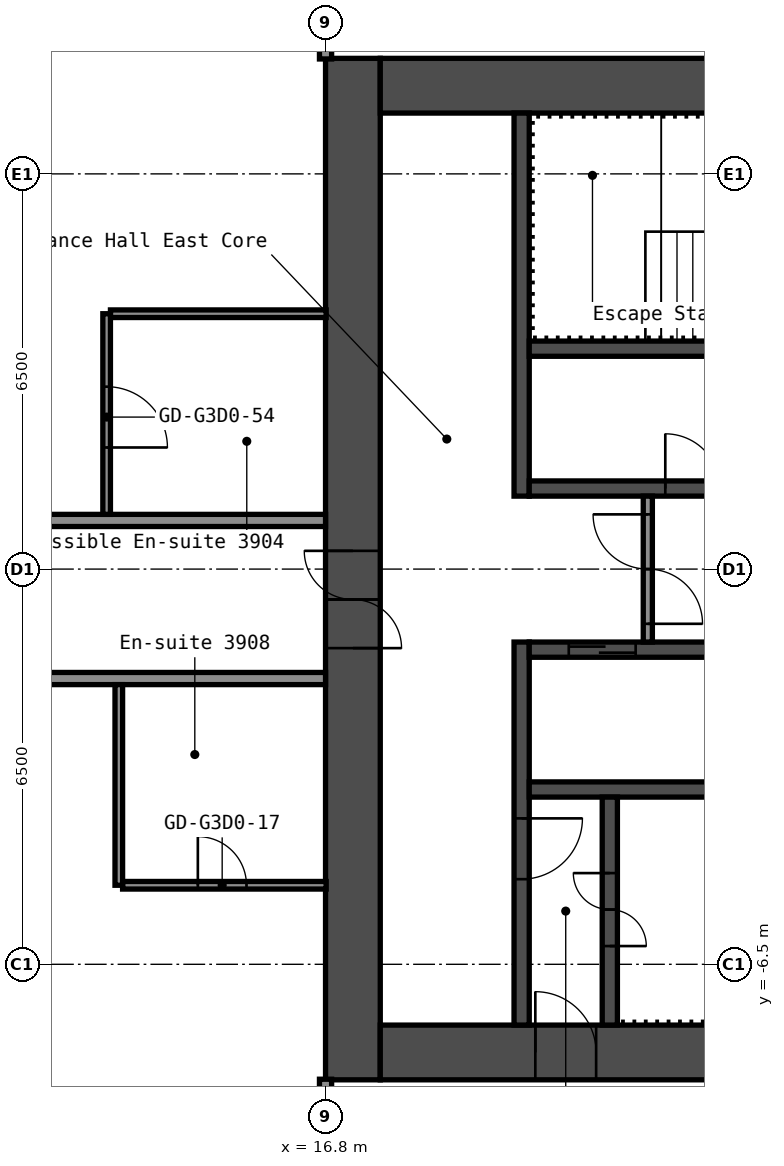
"""IFC4 building model, lengths in metres.
Left out: names, types, materials, properties, quantities, classifications, styles, units other than length and angle.
Written with IfcOpenShell. Run it as: python <this file> out.ifc"""

import sys

from ifc_helpers import new_model, si_unit, direction, frame, frame_2d, origin, place, context, subcontext, project, spatial, rectangle, extrude, element, fill, save


model = new_model("IFC4")
c1 = context("Model", 3, precision=1e-05, world=origin(), true_north=direction((0.0, 1.0)))
c2 = subcontext(c1, "Body", "Model", "MODEL_VIEW")
j1 = project(units=[si_unit("LENGTHUNIT", "METRE"), si_unit("PLANEANGLEUNIT", "RADIAN")], contexts=[c1])
p1 = place(None, origin())
s1 = spatial("IfcSite", under=j1, at=p1, CompositionType="ELEMENT")
p2 = place(p1, origin())
s2 = spatial("IfcBuilding", under=s1, at=p2, CompositionType="ELEMENT")
p3 = place(p2, frame((0.0, 0.0, 140.6)))
s3 = spatial("IfcBuildingStorey", under=s2, at=p3, CompositionType="ELEMENT", Elevation=140.6)
p4 = place(p3, frame((17.25, -8.4, 0.0), z_axis=(0.0, 0.0, 1.0), x_axis=(0.0, 1.0, 0.0)))
e1 = element("IfcWall", 1, at=p4, inside=s3, PredefinedType="SHEAR", context=c2, shape_type="SweptSolid", body=[
    extrude(rectangle(XDim=16.8, YDim=0.9, at=frame_2d((8.4, 0.0))), origin(), (0.0, 0.0, 1.0), 2.75),
])
p5 = place(p4, frame((7.1, 0.0, 0.0)))
e2 = element("IfcOpeningElement", 2, at=p5, cuts=e1, PredefinedType="OPENING", context=c2, shape_type="SweptSolid", body=[
    extrude(rectangle(XDim=1.6, YDim=2.1, at=frame_2d((0.8, 1.05))), frame((0.0, 0.46, 0.0), z_axis=(0.0, -1.0, 0.0), x_axis=(1.0, 0.0, 0.0)), (0.0, 0.0, 1.0), 0.92),
])
p6 = place(p3, frame((17.7, 7.95, 0.0), z_axis=(0.0, 0.0, 1.0), x_axis=(1.0, 0.0, 0.0)))
e3 = element("IfcWall", 3, at=p6, inside=s3, PredefinedType="SHEAR", context=c2, shape_type="SweptSolid", body=[
    extrude(rectangle(XDim=15.0, YDim=0.9, at=frame_2d((7.5, 0.0))), origin(), (0.0, 0.0, 1.0), 2.75),
])
p7 = place(p6, frame((10.4, 0.0, 0.0)))
e4 = element("IfcOpeningElement", 4, at=p7, cuts=e3, PredefinedType="OPENING", context=c2, shape_type="SweptSolid", body=[
    extrude(rectangle(XDim=1.2, YDim=2.1, at=frame_2d((0.6, 1.05))), frame((0.0, 0.46, 0.0), z_axis=(0.0, -1.0, 0.0), x_axis=(1.0, 0.0, 0.0)), (0.0, 0.0, 1.0), 0.92),
])
p8 = place(p6, frame((13.35, 0.0, 0.0)))
e5 = element("IfcOpeningElement", 5, at=p8, cuts=e3, PredefinedType="OPENING", context=c2, shape_type="SweptSolid", body=[
    extrude(rectangle(XDim=0.9, YDim=2.1, at=frame_2d((0.45, 1.05))), frame((0.0, 0.46, 0.0), z_axis=(0.0, -1.0, 0.0), x_axis=(1.0, 0.0, 0.0)), (0.0, 0.0, 1.0), 0.92),
])
p9 = place(p3, frame((17.7, -7.95, 0.0), z_axis=(0.0, 0.0, 1.0), x_axis=(1.0, 0.0, 0.0)))
e6 = element("IfcWall", 6, at=p9, inside=s3, PredefinedType="SHEAR", context=c2, shape_type="SweptSolid", body=[
    extrude(rectangle(XDim=15.0, YDim=0.9, at=frame_2d((7.5, 0.0))), origin(), (0.0, 0.0, 1.0), 2.75),
])
p10 = place(p9, frame((2.55, 0.0, 0.0)))
e7 = element("IfcOpeningElement", 7, at=p10, cuts=e6, PredefinedType="OPENING", context=c2, shape_type="SweptSolid", body=[
    extrude(rectangle(XDim=1.0, YDim=2.1, at=frame_2d((0.5, 1.05))), frame((0.0, 0.46, 0.0), z_axis=(0.0, -1.0, 0.0), x_axis=(1.0, 0.0, 0.0)), (0.0, 0.0, 1.0), 0.92),
])
p11 = place(p3, frame((20.025, 1.2, 0.0), z_axis=(0.0, 0.0, 1.0), x_axis=(0.0, 1.0, 0.0)))
e8 = element("IfcWall", 8, at=p11, inside=s3, PredefinedType="SHEAR", context=c2, shape_type="SweptSolid", body=[
    extrude(rectangle(XDim=6.3, YDim=0.25, at=frame_2d((3.15, 0.0))), origin(), (0.0, 0.0, 1.0), 2.75),
])
p12 = place(p3, frame((20.025, -7.5, 0.0), z_axis=(0.0, 0.0, 1.0), x_axis=(0.0, 1.0, 0.0)))
e9 = element("IfcWall", 9, at=p12, inside=s3, PredefinedType="SHEAR", context=c2, shape_type="SweptSolid", body=[
    extrude(rectangle(XDim=6.3, YDim=0.25, at=frame_2d((3.15, 0.0))), origin(), (0.0, 0.0, 1.0), 2.75),
])
p13 = place(p12, frame((2.4, 0.0, 0.0)))
e10 = element("IfcOpeningElement", 10, at=p13, cuts=e9, PredefinedType="OPENING", context=c2, shape_type="SweptSolid", body=[
    extrude(rectangle(XDim=1.0, YDim=2.1, at=frame_2d((0.5, 1.05))), frame((0.0, 0.135, 0.0), z_axis=(0.0, -1.0, 0.0), x_axis=(1.0, 0.0, 0.0)), (0.0, 0.0, 1.0), 0.27),
])
p14 = place(p3, frame((20.15, 1.325, 0.0), z_axis=(0.0, 0.0, 1.0), x_axis=(1.0, 0.0, 0.0)))
e11 = element("IfcWall", 11, at=p14, inside=s3, PredefinedType="SHEAR", context=c2, shape_type="SweptSolid", body=[
    extrude(rectangle(XDim=7.5, YDim=0.25, at=frame_2d((3.75, 0.0))), origin(), (0.0, 0.0, 1.0), 2.75),
])
p15 = place(p14, frame((2.238, 0.0, 0.0)))
e12 = element("IfcOpeningElement", 12, at=p15, cuts=e11, PredefinedType="OPENING", context=c2, shape_type="SweptSolid", body=[
    extrude(rectangle(XDim=0.9, YDim=2.1, at=frame_2d((0.45, 1.05))), frame((0.0, 0.135, 0.0), z_axis=(0.0, -1.0, 0.0), x_axis=(1.0, 0.0, 0.0)), (0.0, 0.0, 1.0), 0.27),
])
p16 = place(p14, frame((5.938, 0.0, 0.0)))
e13 = element("IfcOpeningElement", 13, at=p16, cuts=e11, PredefinedType="OPENING", context=c2, shape_type="SweptSolid", body=[
    extrude(rectangle(XDim=0.9, YDim=2.1, at=frame_2d((0.45, 1.05))), frame((0.0, 0.135, 0.0), z_axis=(0.0, -1.0, 0.0), x_axis=(1.0, 0.0, 0.0)), (0.0, 0.0, 1.0), 0.27),
])
p17 = place(p3, frame((20.15, 3.625, 0.0), z_axis=(0.0, 0.0, 1.0), x_axis=(1.0, 0.0, 0.0)))
e14 = element("IfcWall", 14, at=p17, inside=s3, PredefinedType="SHEAR", context=c2, shape_type="SweptSolid", body=[
    extrude(rectangle(XDim=7.5, YDim=0.25, at=frame_2d((3.75, 0.0))), origin(), (0.0, 0.0, 1.0), 2.75),
])
p18 = place(p3, frame((20.15, -1.325, 0.0), z_axis=(0.0, 0.0, 1.0), x_axis=(1.0, 0.0, 0.0)))
e15 = element("IfcWall", 15, at=p18, inside=s3, PredefinedType="SHEAR", context=c2, shape_type="SweptSolid", body=[
    extrude(rectangle(XDim=7.5, YDim=0.25, at=frame_2d((3.75, 0.0))), origin(), (0.0, 0.0, 1.0), 2.75),
])
p19 = place(p18, frame((0.65, 0.0, 0.0)))
e16 = element("IfcOpeningElement", 16, at=p19, cuts=e15, PredefinedType="OPENING", context=c2, shape_type="SweptSolid", body=[
    extrude(rectangle(XDim=1.1, YDim=2.1, at=frame_2d((0.55, 1.05))), frame((0.0, 0.135, 0.0), z_axis=(0.0, -1.0, 0.0), x_axis=(1.0, 0.0, 0.0)), (0.0, 0.0, 1.0), 0.27),
])
p20 = place(p18, frame((3.05, 0.0, 0.0)))
e17 = element("IfcOpeningElement", 17, at=p20, cuts=e15, PredefinedType="OPENING", context=c2, shape_type="SweptSolid", body=[
    extrude(rectangle(XDim=1.1, YDim=2.1, at=frame_2d((0.55, 1.05))), frame((0.0, 0.135, 0.0), z_axis=(0.0, -1.0, 0.0), x_axis=(1.0, 0.0, 0.0)), (0.0, 0.0, 1.0), 0.27),
])
p21 = place(p18, frame((5.45, 0.0, 0.0)))
e18 = element("IfcOpeningElement", 18, at=p21, cuts=e15, PredefinedType="OPENING", context=c2, shape_type="SweptSolid", body=[
    extrude(rectangle(XDim=1.1, YDim=2.1, at=frame_2d((0.55, 1.05))), frame((0.0, 0.135, 0.0), z_axis=(0.0, -1.0, 0.0), x_axis=(1.0, 0.0, 0.0)), (0.0, 0.0, 1.0), 0.27),
])
p22 = place(p3, frame((20.15, -3.625, 0.0), z_axis=(0.0, 0.0, 1.0), x_axis=(1.0, 0.0, 0.0)))
e19 = element("IfcWall", 19, at=p22, inside=s3, PredefinedType="SHEAR", context=c2, shape_type="SweptSolid", body=[
    extrude(rectangle(XDim=7.5, YDim=0.25, at=frame_2d((3.75, 0.0))), origin(), (0.0, 0.0, 1.0), 2.75),
])
p23 = place(p3, frame((21.475, -7.5, 0.0), z_axis=(0.0, 0.0, 1.0), x_axis=(0.0, 1.0, 0.0)))
e20 = element("IfcWall", 20, at=p23, inside=s3, PredefinedType="SHEAR", context=c2, shape_type="SweptSolid", body=[
    extrude(rectangle(XDim=3.75, YDim=0.25, at=frame_2d((1.875, 0.0))), origin(), (0.0, 0.0, 1.0), 2.75),
])
p24 = place(p23, frame((1.3, 0.0, 0.0)))
e21 = element("IfcOpeningElement", 21, at=p24, cuts=e20, PredefinedType="OPENING", context=c2, shape_type="SweptSolid", body=[
    extrude(rectangle(XDim=1.2, YDim=2.1, at=frame_2d((0.6, 1.05))), frame((0.0, 0.135, 0.0), z_axis=(0.0, -1.0, 0.0), x_axis=(1.0, 0.0, 0.0)), (0.0, 0.0, 1.0), 0.27),
])
p25 = place(p3, frame((22.1, -1.2, 0.0), z_axis=(0.0, 0.0, 1.0), x_axis=(0.0, 1.0, 0.0)))
e22 = element("IfcWall", 22, at=p25, inside=s3, PredefinedType="PARTITIONING", context=c2, shape_type="SweptSolid", body=[
    extrude(rectangle(XDim=2.4, YDim=0.15, at=frame_2d((1.2, 0.0))), origin(), (0.0, 0.0, 1.0), 2.75),
])
p26 = place(p25, frame((0.3, 0.0, 0.0)))
e23 = element("IfcOpeningElement", 23, at=p26, cuts=e22, PredefinedType="OPENING", context=c2, shape_type="SweptSolid", body=[
    extrude(rectangle(XDim=1.8, YDim=2.1, at=frame_2d((0.9, 1.05))), frame((0.0, 0.085, 0.0), z_axis=(0.0, -1.0, 0.0), x_axis=(1.0, 0.0, 0.0)), (0.0, 0.0, 1.0), 0.17),
])
p27 = place(p3, frame((13.462, -5.2, 0.0), z_axis=(0.0, 0.0, 1.0), x_axis=(1.0, 0.0, 0.0)))
e24 = element("IfcWall", 24, at=p27, inside=s3, PredefinedType="PARTITIONING", context=c2, shape_type="SweptSolid", body=[
    extrude(rectangle(XDim=3.348, YDim=0.125, at=frame_2d((1.674, 0.0))), origin(), (0.0, 0.0, 1.0), 2.75),
])
p28 = place(p27, frame((1.238, 0.0, 0.0)))
e25 = element("IfcOpeningElement", 25, at=p28, cuts=e24, PredefinedType="OPENING", context=c2, shape_type="SweptSolid", body=[
    extrude(rectangle(XDim=0.8, YDim=2.1, at=frame_2d((0.4, 1.05))), frame((0.0, 0.073, 0.0), z_axis=(0.0, -1.0, 0.0), x_axis=(1.0, 0.0, 0.0)), (0.0, 0.0, 1.0), 0.145),
])
p29 = place(p3, frame((-16.8, -1.8, 0.0), z_axis=(0.0, 0.0, 1.0), x_axis=(1.0, 0.0, 0.0)))
e26 = element("IfcWall", 26, at=p29, inside=s3, PredefinedType="PARTITIONING", context=c2, shape_type="SweptSolid", body=[
    extrude(rectangle(XDim=33.6, YDim=0.2, at=frame_2d((16.8, 0.0))), origin(), (0.0, 0.0, 1.0), 2.75),
])
p30 = place(p29, frame((2.85, 0.0, 0.0)))
e27 = element("IfcOpeningElement", 27, at=p30, cuts=e26, PredefinedType="OPENING", context=c2, shape_type="SweptSolid", body=[
    extrude(rectangle(XDim=1.0, YDim=2.1, at=frame_2d((0.5, 1.05))), frame((0.0, 0.11, 0.0), z_axis=(0.0, -1.0, 0.0), x_axis=(1.0, 0.0, 0.0)), (0.0, 0.0, 1.0), 0.22),
])
p31 = place(p29, frame((4.55, 0.0, 0.0)))
e28 = element("IfcOpeningElement", 28, at=p31, cuts=e26, PredefinedType="OPENING", context=c2, shape_type="SweptSolid", body=[
    extrude(rectangle(XDim=1.0, YDim=2.1, at=frame_2d((0.5, 1.05))), frame((0.0, 0.11, 0.0), z_axis=(0.0, -1.0, 0.0), x_axis=(1.0, 0.0, 0.0)), (0.0, 0.0, 1.0), 0.22),
])
p32 = place(p29, frame((12.1, 0.0, 0.0)))
e29 = element("IfcOpeningElement", 29, at=p32, cuts=e26, PredefinedType="OPENING", context=c2, shape_type="SweptSolid", body=[
    extrude(rectangle(XDim=1.0, YDim=2.1, at=frame_2d((0.5, 1.05))), frame((0.0, 0.11, 0.0), z_axis=(0.0, -1.0, 0.0), x_axis=(1.0, 0.0, 0.0)), (0.0, 0.0, 1.0), 0.22),
])
p33 = place(p29, frame((19.65, 0.0, 0.0)))
e30 = element("IfcOpeningElement", 30, at=p33, cuts=e26, PredefinedType="OPENING", context=c2, shape_type="SweptSolid", body=[
    extrude(rectangle(XDim=1.0, YDim=2.1, at=frame_2d((0.5, 1.05))), frame((0.0, 0.11, 0.0), z_axis=(0.0, -1.0, 0.0), x_axis=(1.0, 0.0, 0.0)), (0.0, 0.0, 1.0), 0.22),
])
p34 = place(p29, frame((21.35, 0.0, 0.0)))
e31 = element("IfcOpeningElement", 31, at=p34, cuts=e26, PredefinedType="OPENING", context=c2, shape_type="SweptSolid", body=[
    extrude(rectangle(XDim=1.0, YDim=2.1, at=frame_2d((0.5, 1.05))), frame((0.0, 0.11, 0.0), z_axis=(0.0, -1.0, 0.0), x_axis=(1.0, 0.0, 0.0)), (0.0, 0.0, 1.0), 0.22),
])
p35 = place(p29, frame((27.2, 0.0, 0.0)))
e32 = element("IfcOpeningElement", 32, at=p35, cuts=e26, PredefinedType="OPENING", context=c2, shape_type="SweptSolid", body=[
    extrude(rectangle(XDim=1.0, YDim=2.1, at=frame_2d((0.5, 1.05))), frame((0.0, 0.11, 0.0), z_axis=(0.0, -1.0, 0.0), x_axis=(1.0, 0.0, 0.0)), (0.0, 0.0, 1.0), 0.22),
])
p36 = place(p3, frame((-16.8, 0.8, 0.0), z_axis=(0.0, 0.0, 1.0), x_axis=(1.0, 0.0, 0.0)))
e33 = element("IfcWall", 33, at=p36, inside=s3, PredefinedType="PARTITIONING", context=c2, shape_type="SweptSolid", body=[
    extrude(rectangle(XDim=33.6, YDim=0.2, at=frame_2d((16.8, 0.0))), origin(), (0.0, 0.0, 1.0), 2.75),
])
p37 = place(p36, frame((2.85, 0.0, 0.0)))
e34 = element("IfcOpeningElement", 34, at=p37, cuts=e33, PredefinedType="OPENING", context=c2, shape_type="SweptSolid", body=[
    extrude(rectangle(XDim=1.0, YDim=2.1, at=frame_2d((0.5, 1.05))), frame((0.0, 0.11, 0.0), z_axis=(0.0, -1.0, 0.0), x_axis=(1.0, 0.0, 0.0)), (0.0, 0.0, 1.0), 0.22),
])
p38 = place(p36, frame((4.55, 0.0, 0.0)))
e35 = element("IfcOpeningElement", 35, at=p38, cuts=e33, PredefinedType="OPENING", context=c2, shape_type="SweptSolid", body=[
    extrude(rectangle(XDim=1.0, YDim=2.1, at=frame_2d((0.5, 1.05))), frame((0.0, 0.11, 0.0), z_axis=(0.0, -1.0, 0.0), x_axis=(1.0, 0.0, 0.0)), (0.0, 0.0, 1.0), 0.22),
])
p39 = place(p36, frame((13.8, 0.0, 0.0)))
e36 = element("IfcOpeningElement", 36, at=p39, cuts=e33, PredefinedType="OPENING", context=c2, shape_type="SweptSolid", body=[
    extrude(rectangle(XDim=1.0, YDim=2.1, at=frame_2d((0.5, 1.05))), frame((0.0, 0.11, 0.0), z_axis=(0.0, -1.0, 0.0), x_axis=(1.0, 0.0, 0.0)), (0.0, 0.0, 1.0), 0.22),
])
p40 = place(p36, frame((19.65, 0.0, 0.0)))
e37 = element("IfcOpeningElement", 37, at=p40, cuts=e33, PredefinedType="OPENING", context=c2, shape_type="SweptSolid", body=[
    extrude(rectangle(XDim=1.0, YDim=2.1, at=frame_2d((0.5, 1.05))), frame((0.0, 0.11, 0.0), z_axis=(0.0, -1.0, 0.0), x_axis=(1.0, 0.0, 0.0)), (0.0, 0.0, 1.0), 0.22),
])
p41 = place(p36, frame((21.35, 0.0, 0.0)))
e38 = element("IfcOpeningElement", 38, at=p41, cuts=e33, PredefinedType="OPENING", context=c2, shape_type="SweptSolid", body=[
    extrude(rectangle(XDim=1.0, YDim=2.1, at=frame_2d((0.5, 1.05))), frame((0.0, 0.11, 0.0), z_axis=(0.0, -1.0, 0.0), x_axis=(1.0, 0.0, 0.0)), (0.0, 0.0, 1.0), 0.22),
])
p42 = place(p36, frame((27.1, 0.0, 0.0)))
e39 = element("IfcOpeningElement", 39, at=p42, cuts=e33, PredefinedType="OPENING", context=c2, shape_type="SweptSolid", body=[
    extrude(rectangle(XDim=1.0, YDim=2.1, at=frame_2d((0.5, 1.05))), frame((0.0, 0.11, 0.0), z_axis=(0.0, -1.0, 0.0), x_axis=(1.0, 0.0, 0.0)), (0.0, 0.0, 1.0), 0.22),
])
p43 = place(p3, frame((13.262, 4.2, 0.0), z_axis=(0.0, 0.0, 1.0), x_axis=(1.0, 0.0, 0.0)))
e40 = element("IfcWall", 40, at=p43, inside=s3, PredefinedType="PARTITIONING", context=c2, shape_type="SweptSolid", body=[
    extrude(rectangle(XDim=3.548, YDim=0.125, at=frame_2d((1.774, 0.0))), origin(), (0.0, 0.0, 1.0), 2.75),
])
p44 = place(p3, frame((13.2, 0.9, 0.0), z_axis=(0.0, 0.0, 1.0), x_axis=(0.0, 1.0, 0.0)))
e41 = element("IfcWall", 41, at=p44, inside=s3, PredefinedType="PARTITIONING", context=c2, shape_type="SweptSolid", body=[
    extrude(rectangle(XDim=3.3, YDim=0.125, at=frame_2d((1.65, 0.0))), origin(), (0.0, 0.0, 1.0), 2.75),
])
p45 = place(p44, frame((1.1, 0.0, 0.0)))
e42 = element("IfcOpeningElement", 42, at=p45, cuts=e41, PredefinedType="OPENING", context=c2, shape_type="SweptSolid", body=[
    extrude(rectangle(XDim=1.0, YDim=2.1, at=frame_2d((0.5, 1.05))), frame((0.0, 0.073, 0.0), z_axis=(0.0, -1.0, 0.0), x_axis=(1.0, 0.0, 0.0)), (0.0, 0.0, 1.0), 0.145),
])
p46 = place(p3, frame((13.4, -5.2, 0.0), z_axis=(0.0, 0.0, 1.0), x_axis=(0.0, 1.0, 0.0)))
e43 = element("IfcWall", 43, at=p46, inside=s3, PredefinedType="PARTITIONING", context=c2, shape_type="SweptSolid", body=[
    extrude(rectangle(XDim=3.3, YDim=0.125, at=frame_2d((1.65, 0.0))), origin(), (0.0, 0.0, 1.0), 2.75),
])
p47 = place(p3, frame((16.8, -19.3, 0.0), z_axis=(0.0, 0.0, 1.0), x_axis=(0.0, 1.0, 0.0)))
e44 = element("IfcWall", 44, at=p47, inside=s3, PredefinedType="PARTITIONING", context=c2, shape_type="SweptSolid", body=[
    extrude(rectangle(XDim=10.91, YDim=0.2, at=frame_2d((5.455, 0.0))), origin(), (0.0, 0.0, 1.0), 2.75),
])
p48 = place(p3, frame((16.8, 8.39, 0.0), z_axis=(0.0, 0.0, 1.0), x_axis=(0.0, 1.0, 0.0)))
e45 = element("IfcWall", 45, at=p48, inside=s3, PredefinedType="PARTITIONING", context=c2, shape_type="SweptSolid", body=[
    extrude(rectangle(XDim=9.91, YDim=0.2, at=frame_2d((4.955, 0.0))), origin(), (0.0, 0.0, 1.0), 2.75),
])
p49 = place(p5, origin())
e46 = element("IfcDoor", 46, at=p49, inside=s3, OperationType="DOUBLE_DOOR_SINGLE_SWING", PredefinedType="DOOR", context=c2, shape_type="SweptSolid", body=[
    extrude(rectangle(XDim=1.6, YDim=2.1, at=frame_2d((0.8, 1.05))), frame((0.0, 0.025, 0.0), z_axis=(0.0, -1.0, 0.0), x_axis=(1.0, 0.0, 0.0)), (0.0, 0.0, 1.0), 0.05),
])
fill(e2, e46)
p50 = place(p10, origin())
e47 = element("IfcDoor", 47, at=p50, inside=s3, OperationType="SINGLE_SWING_RIGHT", PredefinedType="DOOR", context=c2, shape_type="SweptSolid", body=[
    extrude(rectangle(XDim=1.0, YDim=2.1, at=frame_2d((0.5, 1.05))), frame((0.0, 0.025, 0.0), z_axis=(0.0, -1.0, 0.0), x_axis=(1.0, 0.0, 0.0)), (0.0, 0.0, 1.0), 0.05),
])
fill(e7, e47)
p51 = place(p24, origin())
e48 = element("IfcDoor", 48, at=p51, inside=s3, OperationType="DOUBLE_DOOR_SINGLE_SWING", PredefinedType="DOOR", context=c2, shape_type="SweptSolid", body=[
    extrude(rectangle(XDim=1.2, YDim=2.1, at=frame_2d((0.6, 1.05))), frame((0.0, 0.025, 0.0), z_axis=(0.0, -1.0, 0.0), x_axis=(1.0, 0.0, 0.0)), (0.0, 0.0, 1.0), 0.05),
])
fill(e21, e48)
p52 = place(p13, origin())
e49 = element("IfcDoor", 49, at=p52, inside=s3, OperationType="SINGLE_SWING_RIGHT", PredefinedType="DOOR", context=c2, shape_type="SweptSolid", body=[
    extrude(rectangle(XDim=1.0, YDim=2.1, at=frame_2d((0.5, 1.05))), frame((0.0, 0.025, 0.0), z_axis=(0.0, -1.0, 0.0), x_axis=(1.0, 0.0, 0.0)), (0.0, 0.0, 1.0), 0.05),
])
fill(e10, e49)
p53 = place(p26, origin())
e50 = element("IfcDoor", 50, at=p53, inside=s3, OperationType="DOUBLE_DOOR_SINGLE_SWING", PredefinedType="DOOR", context=c2, shape_type="SweptSolid", body=[
    extrude(rectangle(XDim=1.8, YDim=2.1, at=frame_2d((0.9, 1.05))), frame((0.0, 0.025, 0.0), z_axis=(0.0, -1.0, 0.0), x_axis=(1.0, 0.0, 0.0)), (0.0, 0.0, 1.0), 0.05),
])
fill(e23, e50)
p54 = place(p15, origin())
e51 = element("IfcDoor", 51, at=p54, inside=s3, OperationType="SINGLE_SWING_RIGHT", PredefinedType="DOOR", context=c2, shape_type="SweptSolid", body=[
    extrude(rectangle(XDim=0.9, YDim=2.1, at=frame_2d((0.45, 1.05))), frame((0.0, 0.025, 0.0), z_axis=(0.0, -1.0, 0.0), x_axis=(1.0, 0.0, 0.0)), (0.0, 0.0, 1.0), 0.05),
])
fill(e12, e51)
p55 = place(p19, origin())
e52 = element("IfcDoor", 52, at=p55, inside=s3, OperationType="DOUBLE_DOOR_SLIDING", PredefinedType="DOOR", context=c2, shape_type="SweptSolid", body=[
    extrude(rectangle(XDim=1.1, YDim=2.1, at=frame_2d((0.55, 1.05))), frame((0.0, 0.025, 0.0), z_axis=(0.0, -1.0, 0.0), x_axis=(1.0, 0.0, 0.0)), (0.0, 0.0, 1.0), 0.05),
])
fill(e16, e52)
p56 = place(p28, origin())
e53 = element("IfcDoor", 53, at=p56, inside=s3, OperationType="SINGLE_SWING_RIGHT", PredefinedType="DOOR", context=c2, shape_type="SweptSolid", body=[
    extrude(rectangle(XDim=0.8, YDim=2.1, at=frame_2d((0.4, 1.05))), frame((0.0, 0.025, 0.0), z_axis=(0.0, -1.0, 0.0), x_axis=(1.0, 0.0, 0.0)), (0.0, 0.0, 1.0), 0.05),
])
fill(e25, e53)
p57 = place(p45, origin())
e54 = element("IfcDoor", 54, at=p57, inside=s3, OperationType="SINGLE_SWING_LEFT", PredefinedType="DOOR", context=c2, shape_type="SweptSolid", body=[
    extrude(rectangle(XDim=1.0, YDim=2.1, at=frame_2d((0.5, 1.05))), frame((0.0, 0.025, 0.0), z_axis=(0.0, -1.0, 0.0), x_axis=(1.0, 0.0, 0.0)), (0.0, 0.0, 1.0), 0.05),
])
fill(e42, e54)
save(model, sys.argv[1])
